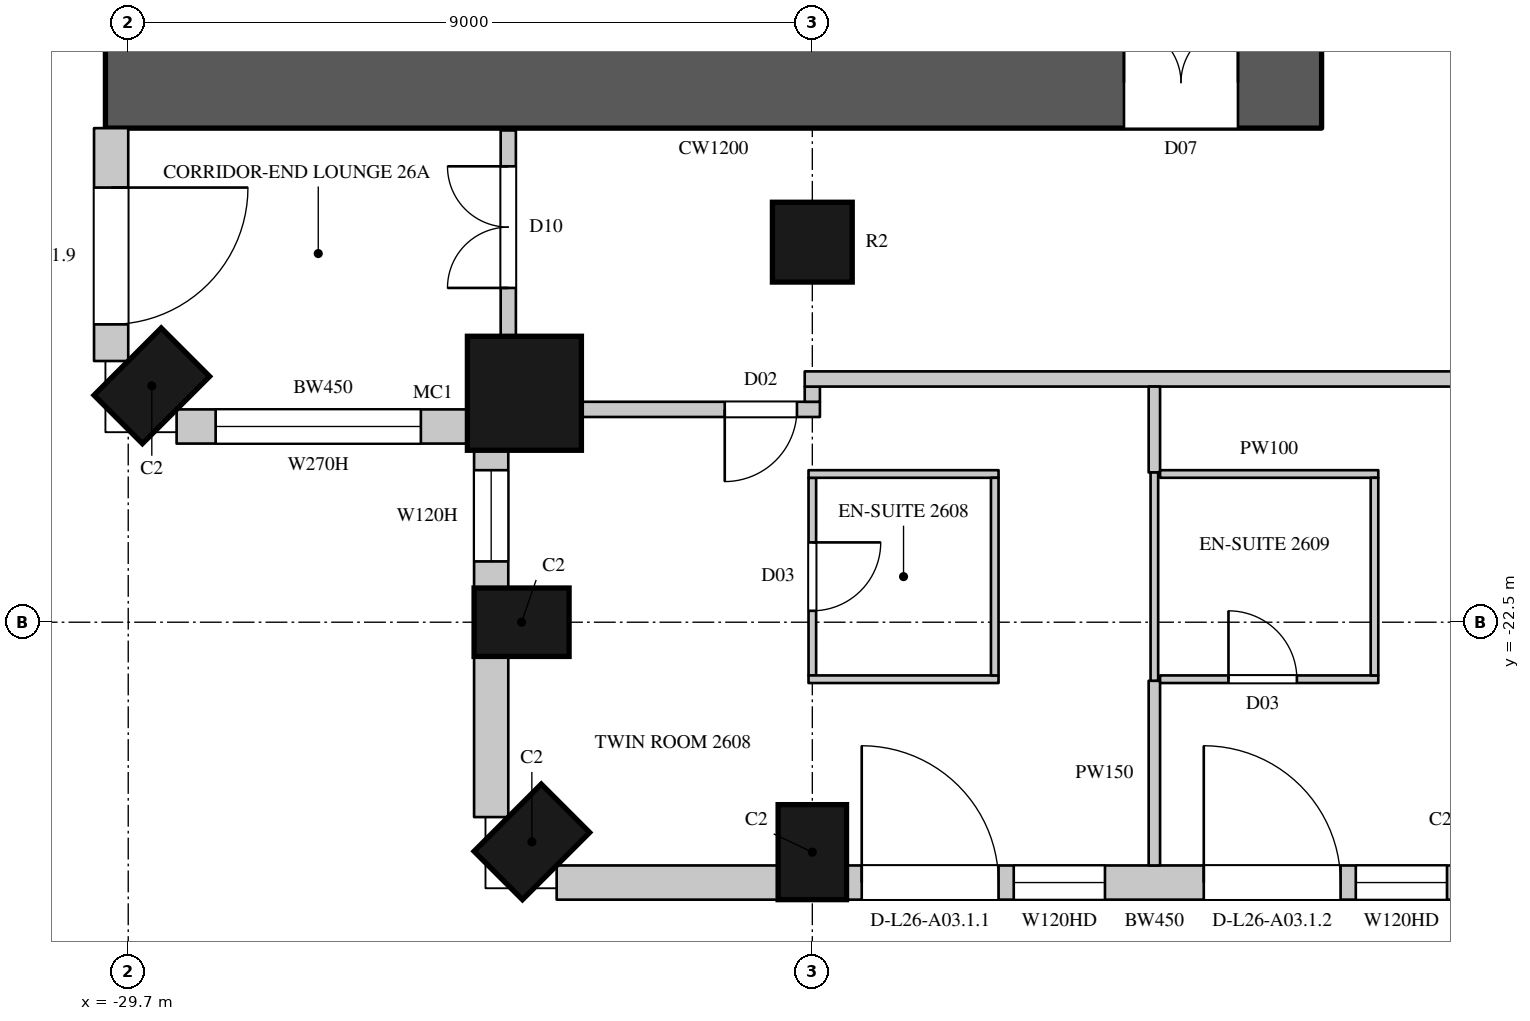
"""IFC4 building model, lengths in metres.
Left out: names, types, materials, properties, quantities, classifications, styles, units other than length and angle.
Written with IfcOpenShell. Run it as: python <this file> out.ifc"""

import sys

from ifc_helpers import new_model, si_unit, direction, frame, frame_2d, origin, origin_2d, place, context, subcontext, project, spatial, rectangle, circle, extrude, element, fill, save


model = new_model("IFC4")
c1 = context("Model", 3, precision=1e-05, world=origin(), true_north=direction((0.0, 1.0)))
c2 = subcontext(c1, "Body", "Model", "MODEL_VIEW")
j1 = project(units=[si_unit("LENGTHUNIT", "METRE"), si_unit("PLANEANGLEUNIT", "RADIAN")], contexts=[c1])
p1 = place(None, origin())
s1 = spatial("IfcSite", under=j1, at=p1, CompositionType="ELEMENT")
p2 = place(p1, origin())
s2 = spatial("IfcBuilding", under=s1, at=p2, CompositionType="ELEMENT")
p3 = place(p2, frame((0.0, 0.0, 123.9)))
s3 = spatial("IfcBuildingStorey", under=s2, at=p3, CompositionType="ELEMENT", Elevation=123.9)
p4 = place(p3, frame((-29.39, -19.39, 0.0), z_axis=(0.0, 0.0, 1.0), x_axis=(0.707106781187, -0.707106781187, 0.0)))
e1 = element("IfcColumn", 1, at=p4, inside=s3, PredefinedType="COLUMN", context=c2, shape_type="SweptSolid", body=[
    extrude(rectangle(XDim=0.9, YDim=1.25, at=origin_2d()), origin(), (0.0, 0.0, 1.0), 3.6),
])
p5 = place(p3, frame((-24.488, -19.488, 0.0), z_axis=(0.0, 0.0, 1.0), x_axis=(1.0, 0.0, 0.0)))
e2 = element("IfcColumn", 2, at=p5, inside=s3, PredefinedType="COLUMN", context=c2, shape_type="SweptSolid", body=[
    extrude(circle(Radius=0.75, at=origin_2d()), origin(), (0.0, 0.0, 1.0), 3.6),
])
for number, where, z_axis, x_axis in (
    (3, (-24.525, -22.5, 0.0), (0.0, 0.0, 1.0), (0.0, -1.0, 0.0)),
    (4, (-24.39, -25.39, 0.0), (0.0, 0.0, 1.0), (0.707, -0.707, 0.0)),
    (5, (-20.7, -25.525, 0.0), (0.0, 0.0, 1.0), (1.0, 0.0, 0.0)),
):
    element("IfcColumn", number, at=place(p3, frame(where, z_axis=z_axis, x_axis=x_axis)), inside=s3, PredefinedType="COLUMN", context=c2, shape_type="SweptSolid", body=[
        extrude(rectangle(XDim=0.9, YDim=1.25, at=origin_2d()), origin(), (0.0, 0.0, 1.0), 3.6),
    ])
p6 = place(p3, frame((-20.7, -17.5, 0.0), z_axis=(0.0, 0.0, 1.0), x_axis=(1.0, 0.0, 0.0)))
e6 = element("IfcColumn", 6, at=p6, inside=s3, PredefinedType="COLUMN", context=c2, shape_type="SweptSolid", body=[
    extrude(circle(Radius=0.525, at=origin_2d()), origin(), (0.0, 0.0, 1.0), 3.6),
])
p7 = place(p3, frame((-29.925, -16.0, 0.0), z_axis=(0.0, 0.0, 1.0), x_axis=(0.0, -1.0, 0.0)))
e7 = element("IfcWall", 7, at=p7, inside=s3, PredefinedType="SOLIDWALL", context=c2, shape_type="SweptSolid", body=[
    extrude(rectangle(XDim=3.064, YDim=0.45, at=frame_2d((1.532, 0.0))), origin(), (0.0, 0.0, 1.0), 3.3),
])
p8 = place(p7, frame((0.782, 0.0, 0.0)))
e8 = element("IfcOpeningElement", 8, at=p8, cuts=e7, PredefinedType="OPENING", context=c2, shape_type="SweptSolid", body=[
    extrude(rectangle(XDim=1.8, YDim=2.4, at=frame_2d((0.9, 1.2))), frame((0.0, 0.235, 0.0), z_axis=(0.0, -1.0, 0.0), x_axis=(1.0, 0.0, 0.0)), (0.0, 0.0, 1.0), 0.47),
])
p9 = place(p3, frame((-29.064, -19.925, 0.0), z_axis=(0.0, 0.0, 1.0), x_axis=(1.0, 0.0, 0.0)))
e9 = element("IfcWall", 9, at=p9, inside=s3, PredefinedType="SOLIDWALL", context=c2, shape_type="SweptSolid", body=[
    extrude(rectangle(XDim=3.857, YDim=0.45, at=frame_2d((1.928, 0.0))), origin(), (0.0, 0.0, 1.0), 3.3),
])
p10 = place(p9, frame((0.514, 0.0, 1.05)))
e10 = element("IfcOpeningElement", 10, at=p10, cuts=e9, PredefinedType="OPENING", context=c2, shape_type="SweptSolid", body=[
    extrude(rectangle(XDim=2.7, YDim=2.0, at=frame_2d((1.35, 1.0))), frame((0.0, 0.235, 0.0), z_axis=(0.0, -1.0, 0.0), x_axis=(1.0, 0.0, 0.0)), (0.0, 0.0, 1.0), 0.47),
])
p11 = place(p3, frame((-24.925, -20.207, 0.0), z_axis=(0.0, 0.0, 1.0), x_axis=(0.0, -1.0, 0.0)))
e11 = element("IfcWall", 11, at=p11, inside=s3, PredefinedType="SOLIDWALL", context=c2, shape_type="SweptSolid", body=[
    extrude(rectangle(XDim=1.843, YDim=0.45, at=frame_2d((0.921, 0.0))), origin(), (0.0, 0.0, 1.0), 3.3),
])
p12 = place(p11, frame((0.293, 0.0, 1.05)))
e12 = element("IfcOpeningElement", 12, at=p12, cuts=e11, PredefinedType="OPENING", context=c2, shape_type="SweptSolid", body=[
    extrude(rectangle(XDim=1.2, YDim=2.0, at=frame_2d((0.6, 1.0))), frame((0.0, 0.235, 0.0), z_axis=(0.0, -1.0, 0.0), x_axis=(1.0, 0.0, 0.0)), (0.0, 0.0, 1.0), 0.47),
])
p13 = place(p3, frame((-24.925, -22.95, 0.0), z_axis=(0.0, 0.0, 1.0), x_axis=(0.0, -1.0, 0.0)))
e13 = element("IfcWall", 13, at=p13, inside=s3, PredefinedType="SOLIDWALL", context=c2, shape_type="SweptSolid", body=[
    extrude(rectangle(XDim=2.114, YDim=0.45, at=frame_2d((1.057, 0.0))), origin(), (0.0, 0.0, 1.0), 3.3),
])
p14 = place(p3, frame((-24.064, -25.925, 0.0), z_axis=(0.0, 0.0, 1.0), x_axis=(1.0, 0.0, 0.0)))
e14 = element("IfcWall", 14, at=p14, inside=s3, PredefinedType="SOLIDWALL", context=c2, shape_type="SweptSolid", body=[
    extrude(rectangle(XDim=2.914, YDim=0.45, at=frame_2d((1.457, 0.0))), origin(), (0.0, 0.0, 1.0), 3.3),
])
p15 = place(p3, frame((-20.25, -25.925, 0.0), z_axis=(0.0, 0.0, 1.0), x_axis=(1.0, 0.0, 0.0)))
e15 = element("IfcWall", 15, at=p15, inside=s3, PredefinedType="SOLIDWALL", context=c2, shape_type="SweptSolid", body=[
    extrude(rectangle(XDim=8.1, YDim=0.45, at=frame_2d((4.05, 0.0))), origin(), (0.0, 0.0, 1.0), 3.3),
])
p16 = place(p15, frame((0.2, 0.0, 0.0)))
e16 = element("IfcOpeningElement", 16, at=p16, cuts=e15, PredefinedType="OPENING", context=c2, shape_type="SweptSolid", body=[
    extrude(rectangle(XDim=1.8, YDim=2.4, at=frame_2d((0.9, 1.2))), frame((0.0, 0.235, 0.0), z_axis=(0.0, -1.0, 0.0), x_axis=(1.0, 0.0, 0.0)), (0.0, 0.0, 1.0), 0.47),
])
p17 = place(p15, frame((2.2, 0.0, 1.05)))
e17 = element("IfcOpeningElement", 17, at=p17, cuts=e15, PredefinedType="OPENING", context=c2, shape_type="SweptSolid", body=[
    extrude(rectangle(XDim=1.2, YDim=2.0, at=frame_2d((0.6, 1.0))), frame((0.0, 0.235, 0.0), z_axis=(0.0, -1.0, 0.0), x_axis=(1.0, 0.0, 0.0)), (0.0, 0.0, 1.0), 0.47),
])
p18 = place(p15, frame((4.7, 0.0, 0.0)))
e18 = element("IfcOpeningElement", 18, at=p18, cuts=e15, PredefinedType="OPENING", context=c2, shape_type="SweptSolid", body=[
    extrude(rectangle(XDim=1.8, YDim=2.4, at=frame_2d((0.9, 1.2))), frame((0.0, 0.235, 0.0), z_axis=(0.0, -1.0, 0.0), x_axis=(1.0, 0.0, 0.0)), (0.0, 0.0, 1.0), 0.47),
])
p19 = place(p15, frame((6.7, 0.0, 1.05)))
e19 = element("IfcOpeningElement", 19, at=p19, cuts=e15, PredefinedType="OPENING", context=c2, shape_type="SweptSolid", body=[
    extrude(rectangle(XDim=1.2, YDim=2.0, at=frame_2d((0.6, 1.0))), frame((0.0, 0.235, 0.0), z_axis=(0.0, -1.0, 0.0), x_axis=(1.0, 0.0, 0.0)), (0.0, 0.0, 1.0), 0.47),
])
p20 = place(p3, frame((-30.0, -15.4, 0.0), z_axis=(0.0, 0.0, 1.0), x_axis=(1.0, 0.0, 0.0)))
e20 = element("IfcWall", 20, at=p20, inside=s3, PredefinedType="SHEAR", context=c2, shape_type="SweptSolid", body=[
    extrude(rectangle(XDim=16.0, YDim=1.2, at=frame_2d((8.0, 0.0))), origin(), (0.0, 0.0, 1.0), 3.6),
])
p21 = place(p20, frame((13.4, 0.0, 0.0)))
e21 = element("IfcOpeningElement", 21, at=p21, cuts=e20, PredefinedType="OPENING", context=c2, shape_type="SweptSolid", body=[
    extrude(rectangle(XDim=1.5, YDim=2.4, at=frame_2d((0.75, 1.2))), frame((0.0, 0.61, 0.0), z_axis=(0.0, -1.0, 0.0), x_axis=(1.0, 0.0, 0.0)), (0.0, 0.0, 1.0), 1.22),
])
p22 = place(p3, frame((-24.7, -18.752, 0.0), z_axis=(0.0, 0.0, 1.0), x_axis=(0.0, 1.0, 0.0)))
e22 = element("IfcWall", 22, at=p22, inside=s3, PredefinedType="PARTITIONING", context=c2, shape_type="SweptSolid", body=[
    extrude(rectangle(XDim=2.722, YDim=0.2, at=frame_2d((1.361, 0.0))), origin(), (0.0, 0.0, 1.0), 3.3),
])
p23 = place(p22, frame((0.65, 0.0, 0.0)))
e23 = element("IfcOpeningElement", 23, at=p23, cuts=e22, PredefinedType="OPENING", context=c2, shape_type="SweptSolid", body=[
    extrude(rectangle(XDim=1.6, YDim=2.4, at=frame_2d((0.8, 1.2))), frame((0.0, 0.11, 0.0), z_axis=(0.0, -1.0, 0.0), x_axis=(1.0, 0.0, 0.0)), (0.0, 0.0, 1.0), 0.22),
])
p24 = place(p3, frame((-23.752, -19.7, 0.0), z_axis=(0.0, 0.0, 1.0), x_axis=(1.0, 0.0, 0.0)))
e24 = element("IfcWall", 24, at=p24, inside=s3, PredefinedType="PARTITIONING", context=c2, shape_type="SweptSolid", body=[
    extrude(rectangle(XDim=3.152, YDim=0.2, at=frame_2d((1.576, 0.0))), origin(), (0.0, 0.0, 1.0), 3.3),
])
p25 = place(p24, frame((1.9, 0.0, 0.0)))
e25 = element("IfcOpeningElement", 25, at=p25, cuts=e24, PredefinedType="OPENING", context=c2, shape_type="SweptSolid", body=[
    extrude(rectangle(XDim=0.95, YDim=2.2, at=frame_2d((0.475, 1.1))), frame((0.0, 0.11, 0.0), z_axis=(0.0, -1.0, 0.0), x_axis=(1.0, 0.0, 0.0)), (0.0, 0.0, 1.0), 0.22),
])
p26 = place(p3, frame((-20.7, -19.6, 0.0), z_axis=(0.0, 0.0, 1.0), x_axis=(0.0, 1.0, 0.0)))
e26 = element("IfcWall", 26, at=p26, inside=s3, PredefinedType="PARTITIONING", context=c2, shape_type="SweptSolid", body=[
    extrude(rectangle(XDim=0.2, YDim=0.2, at=frame_2d((0.1, 0.0))), origin(), (0.0, 0.0, 1.0), 3.3),
])
p27 = place(p3, frame((-20.8, -19.3, 0.0), z_axis=(0.0, 0.0, 1.0), x_axis=(1.0, 0.0, 0.0)))
e27 = element("IfcWall", 27, at=p27, inside=s3, PredefinedType="PARTITIONING", context=c2, shape_type="SweptSolid", body=[
    extrude(rectangle(XDim=38.6, YDim=0.2, at=frame_2d((19.3, 0.0))), origin(), (0.0, 0.0, 1.0), 3.3),
])
p28 = place(p27, frame((11.2, 0.0, 0.0)))
e28 = element("IfcOpeningElement", 28, at=p28, cuts=e27, PredefinedType="OPENING", context=c2, shape_type="SweptSolid", body=[
    extrude(rectangle(XDim=0.95, YDim=2.2, at=frame_2d((0.475, 1.1))), frame((0.0, 0.11, 0.0), z_axis=(0.0, -1.0, 0.0), x_axis=(1.0, 0.0, 0.0)), (0.0, 0.0, 1.0), 0.22),
])
p29 = place(p27, frame((15.05, 0.0, 0.0)))
e29 = element("IfcOpeningElement", 29, at=p29, cuts=e27, PredefinedType="OPENING", context=c2, shape_type="SweptSolid", body=[
    extrude(rectangle(XDim=0.95, YDim=2.2, at=frame_2d((0.475, 1.1))), frame((0.0, 0.11, 0.0), z_axis=(0.0, -1.0, 0.0), x_axis=(1.0, 0.0, 0.0)), (0.0, 0.0, 1.0), 0.22),
])
p30 = place(p27, frame((29.2, 0.0, 0.0)))
e30 = element("IfcOpeningElement", 30, at=p30, cuts=e27, PredefinedType="OPENING", context=c2, shape_type="SweptSolid", body=[
    extrude(rectangle(XDim=0.95, YDim=2.2, at=frame_2d((0.475, 1.1))), frame((0.0, 0.11, 0.0), z_axis=(0.0, -1.0, 0.0), x_axis=(1.0, 0.0, 0.0)), (0.0, 0.0, 1.0), 0.22),
])
p31 = place(p27, frame((33.05, 0.0, 0.0)))
e31 = element("IfcOpeningElement", 31, at=p31, cuts=e27, PredefinedType="OPENING", context=c2, shape_type="SweptSolid", body=[
    extrude(rectangle(XDim=0.95, YDim=2.2, at=frame_2d((0.475, 1.1))), frame((0.0, 0.11, 0.0), z_axis=(0.0, -1.0, 0.0), x_axis=(1.0, 0.0, 0.0)), (0.0, 0.0, 1.0), 0.22),
])
p32 = place(p3, frame((-16.2, -25.7, 0.0), z_axis=(0.0, 0.0, 1.0), x_axis=(0.0, 1.0, 0.0)))
e32 = element("IfcWall", 32, at=p32, inside=s3, PredefinedType="PARTITIONING", context=c2, shape_type="SweptSolid", body=[
    extrude(rectangle(XDim=2.43, YDim=0.15, at=frame_2d((1.215, 0.0))), origin(), (0.0, 0.0, 1.0), 2.65),
])
p33 = place(p3, frame((-16.2, -20.53, 0.0), z_axis=(0.0, 0.0, 1.0), x_axis=(0.0, 1.0, 0.0)))
e33 = element("IfcWall", 33, at=p33, inside=s3, PredefinedType="PARTITIONING", context=c2, shape_type="SweptSolid", body=[
    extrude(rectangle(XDim=1.13, YDim=0.15, at=frame_2d((0.565, 0.0))), origin(), (0.0, 0.0, 1.0), 2.65),
])
p34 = place(p3, frame((-20.7, -23.2, 0.0), z_axis=(0.0, 0.0, 1.0), x_axis=(0.0, 1.0, 0.0)))
e34 = element("IfcWall", 34, at=p34, inside=s3, PredefinedType="PARTITIONING", context=c2, shape_type="SweptSolid", body=[
    extrude(rectangle(XDim=2.6, YDim=0.1, at=frame_2d((1.3, 0.0))), origin(), (0.0, 0.0, 1.0), 2.75),
])
p35 = place(p34, frame((0.85, 0.0, 0.0)))
e35 = element("IfcOpeningElement", 35, at=p35, cuts=e34, PredefinedType="OPENING", context=c2, shape_type="SweptSolid", body=[
    extrude(rectangle(XDim=0.9, YDim=2.2, at=frame_2d((0.45, 1.1))), frame((0.0, 0.06, 0.0), z_axis=(0.0, -1.0, 0.0), x_axis=(1.0, 0.0, 0.0)), (0.0, 0.0, 1.0), 0.12),
])
for number, where, z_axis, x_axis in (
    (36, (-20.75, -23.25, 0.0), (0.0, 0.0, 1.0), (1.0, 0.0, 0.0)),
    (37, (-20.75, -20.55, 0.0), (0.0, 0.0, 1.0), (1.0, 0.0, 0.0)),
):
    element("IfcWall", number, at=place(p3, frame(where, z_axis=z_axis, x_axis=x_axis)), inside=s3, PredefinedType="PARTITIONING", context=c2, shape_type="SweptSolid", body=[
        extrude(rectangle(XDim=2.5, YDim=0.1, at=frame_2d((1.25, 0.0))), origin(), (0.0, 0.0, 1.0), 3.3),
    ])
p36 = place(p3, frame((-18.3, -23.2, 0.0), z_axis=(0.0, 0.0, 1.0), x_axis=(0.0, 1.0, 0.0)))
e38 = element("IfcWall", 38, at=p36, inside=s3, PredefinedType="PARTITIONING", context=c2, shape_type="SweptSolid", body=[
    extrude(rectangle(XDim=2.6, YDim=0.1, at=frame_2d((1.3, 0.0))), origin(), (0.0, 0.0, 1.0), 3.3),
])
p37 = place(p3, frame((-16.2, -23.27, 0.0), z_axis=(0.0, 0.0, 1.0), x_axis=(0.0, 1.0, 0.0)))
e39 = element("IfcWall", 39, at=p37, inside=s3, PredefinedType="PARTITIONING", context=c2, shape_type="SweptSolid", body=[
    extrude(rectangle(XDim=2.74, YDim=0.1, at=frame_2d((1.37, 0.0))), origin(), (0.0, 0.0, 1.0), 2.65),
])
p38 = place(p3, frame((-16.125, -23.25, 0.0), z_axis=(0.0, 0.0, 1.0), x_axis=(1.0, 0.0, 0.0)))
e40 = element("IfcWall", 40, at=p38, inside=s3, PredefinedType="PARTITIONING", context=c2, shape_type="SweptSolid", body=[
    extrude(rectangle(XDim=2.871, YDim=0.1, at=frame_2d((1.436, 0.0))), origin(), (0.0, 0.0, 1.0), 3.3),
])
p39 = place(p38, frame((0.9, 0.0, 0.0)))
e41 = element("IfcOpeningElement", 41, at=p39, cuts=e40, PredefinedType="OPENING", context=c2, shape_type="SweptSolid", body=[
    extrude(rectangle(XDim=0.9, YDim=2.2, at=frame_2d((0.45, 1.1))), frame((0.0, 0.06, 0.0), z_axis=(0.0, -1.0, 0.0), x_axis=(1.0, 0.0, 0.0)), (0.0, 0.0, 1.0), 0.12),
])
p40 = place(p3, frame((-16.125, -20.55, 0.0), z_axis=(0.0, 0.0, 1.0), x_axis=(1.0, 0.0, 0.0)))
e42 = element("IfcWall", 42, at=p40, inside=s3, PredefinedType="PARTITIONING", context=c2, shape_type="SweptSolid", body=[
    extrude(rectangle(XDim=2.871, YDim=0.1, at=frame_2d((1.436, 0.0))), origin(), (0.0, 0.0, 1.0), 3.3),
])
p41 = place(p3, frame((-13.304, -23.2, 0.0), z_axis=(0.0, 0.0, 1.0), x_axis=(0.0, 1.0, 0.0)))
e43 = element("IfcWall", 43, at=p41, inside=s3, PredefinedType="PARTITIONING", context=c2, shape_type="SweptSolid", body=[
    extrude(rectangle(XDim=2.6, YDim=0.1, at=frame_2d((1.3, 0.0))), origin(), (0.0, 0.0, 1.0), 3.3),
])
p42 = place(p8, origin())
e44 = element("IfcDoor", 44, at=p42, inside=s3, OperationType="SLIDING_TO_LEFT", PredefinedType="DOOR", context=c2, shape_type="SweptSolid", body=[
    extrude(rectangle(XDim=1.8, YDim=2.4, at=frame_2d((0.9, 1.2))), frame((0.0, 0.13, 0.0), z_axis=(0.0, -1.0, 0.0), x_axis=(1.0, 0.0, 0.0)), (0.0, 0.0, 1.0), 0.05),
])
fill(e8, e44)
p43 = place(p10, origin())
e45 = element("IfcWindow", 45, at=p43, inside=s3, PartitioningType="SINGLE_PANEL", PredefinedType="WINDOW", context=c2, shape_type="SweptSolid", body=[
    extrude(rectangle(XDim=2.7, YDim=2.0, at=frame_2d((1.35, 1.0))), frame((0.0, 0.135, 0.0), z_axis=(0.0, -1.0, 0.0), x_axis=(1.0, 0.0, 0.0)), (0.0, 0.0, 1.0), 0.06),
])
fill(e10, e45)
p44 = place(p12, origin())
e46 = element("IfcWindow", 46, at=p44, inside=s3, PartitioningType="SINGLE_PANEL", PredefinedType="WINDOW", context=c2, shape_type="SweptSolid", body=[
    extrude(rectangle(XDim=1.2, YDim=2.0, at=frame_2d((0.6, 1.0))), frame((0.0, 0.135, 0.0), z_axis=(0.0, -1.0, 0.0), x_axis=(1.0, 0.0, 0.0)), (0.0, 0.0, 1.0), 0.06),
])
fill(e12, e46)
p45 = place(p16, origin())
e47 = element("IfcDoor", 47, at=p45, inside=s3, OperationType="SLIDING_TO_LEFT", PredefinedType="DOOR", context=c2, shape_type="SweptSolid", body=[
    extrude(rectangle(XDim=1.8, YDim=2.4, at=frame_2d((0.9, 1.2))), frame((0.0, 0.13, 0.0), z_axis=(0.0, -1.0, 0.0), x_axis=(1.0, 0.0, 0.0)), (0.0, 0.0, 1.0), 0.05),
])
fill(e16, e47)
p46 = place(p17, origin())
e48 = element("IfcWindow", 48, at=p46, inside=s3, PartitioningType="SINGLE_PANEL", PredefinedType="WINDOW", context=c2, shape_type="SweptSolid", body=[
    extrude(rectangle(XDim=1.2, YDim=2.0, at=frame_2d((0.6, 1.0))), frame((0.0, 0.135, 0.0), z_axis=(0.0, -1.0, 0.0), x_axis=(1.0, 0.0, 0.0)), (0.0, 0.0, 1.0), 0.06),
])
fill(e17, e48)
p47 = place(p18, origin())
e49 = element("IfcDoor", 49, at=p47, inside=s3, OperationType="SLIDING_TO_LEFT", PredefinedType="DOOR", context=c2, shape_type="SweptSolid", body=[
    extrude(rectangle(XDim=1.8, YDim=2.4, at=frame_2d((0.9, 1.2))), frame((0.0, 0.13, 0.0), z_axis=(0.0, -1.0, 0.0), x_axis=(1.0, 0.0, 0.0)), (0.0, 0.0, 1.0), 0.05),
])
fill(e18, e49)
p48 = place(p19, origin())
e50 = element("IfcWindow", 50, at=p48, inside=s3, PartitioningType="SINGLE_PANEL", PredefinedType="WINDOW", context=c2, shape_type="SweptSolid", body=[
    extrude(rectangle(XDim=1.2, YDim=2.0, at=frame_2d((0.6, 1.0))), frame((0.0, 0.135, 0.0), z_axis=(0.0, -1.0, 0.0), x_axis=(1.0, 0.0, 0.0)), (0.0, 0.0, 1.0), 0.06),
])
fill(e19, e50)
p49 = place(p23, origin())
e51 = element("IfcDoor", 51, at=p49, inside=s3, OperationType="DOUBLE_DOOR_SINGLE_SWING", PredefinedType="DOOR", context=c2, shape_type="SweptSolid", body=[
    extrude(rectangle(XDim=1.6, YDim=2.4, at=frame_2d((0.8, 1.2))), frame((0.0, 0.025, 0.0), z_axis=(0.0, -1.0, 0.0), x_axis=(1.0, 0.0, 0.0)), (0.0, 0.0, 1.0), 0.05),
])
fill(e23, e51)
p50 = place(p25, origin())
e52 = element("IfcDoor", 52, at=p50, inside=s3, OperationType="SINGLE_SWING_RIGHT", PredefinedType="DOOR", context=c2, shape_type="SweptSolid", body=[
    extrude(rectangle(XDim=0.95, YDim=2.2, at=frame_2d((0.475, 1.1))), frame((0.0, 0.025, 0.0), z_axis=(0.0, -1.0, 0.0), x_axis=(1.0, 0.0, 0.0)), (0.0, 0.0, 1.0), 0.05),
])
fill(e25, e52)
p51 = place(p35, origin())
e53 = element("IfcDoor", 53, at=p51, inside=s3, OperationType="SINGLE_SWING_LEFT", PredefinedType="DOOR", context=c2, shape_type="SweptSolid", body=[
    extrude(rectangle(XDim=0.9, YDim=2.2, at=frame_2d((0.45, 1.1))), frame((0.0, 0.025, 0.0), z_axis=(0.0, -1.0, 0.0), x_axis=(1.0, 0.0, 0.0)), (0.0, 0.0, 1.0), 0.05),
])
fill(e35, e53)
p52 = place(p39, origin())
e54 = element("IfcDoor", 54, at=p52, inside=s3, OperationType="SINGLE_SWING_LEFT", PredefinedType="DOOR", context=c2, shape_type="SweptSolid", body=[
    extrude(rectangle(XDim=0.9, YDim=2.2, at=frame_2d((0.45, 1.1))), frame((0.0, 0.025, 0.0), z_axis=(0.0, -1.0, 0.0), x_axis=(1.0, 0.0, 0.0)), (0.0, 0.0, 1.0), 0.05),
])
fill(e41, e54)
p53 = place(p21, origin())
e55 = element("IfcDoor", 55, at=p53, inside=s3, OperationType="DOUBLE_DOOR_SINGLE_SWING", PredefinedType="DOOR", context=c2, shape_type="SweptSolid", body=[
    extrude(rectangle(XDim=1.5, YDim=2.4, at=frame_2d((0.75, 1.2))), frame((0.0, 0.025, 0.0), z_axis=(0.0, -1.0, 0.0), x_axis=(1.0, 0.0, 0.0)), (0.0, 0.0, 1.0), 0.05),
])
fill(e21, e55)
save(model, sys.argv[1])
